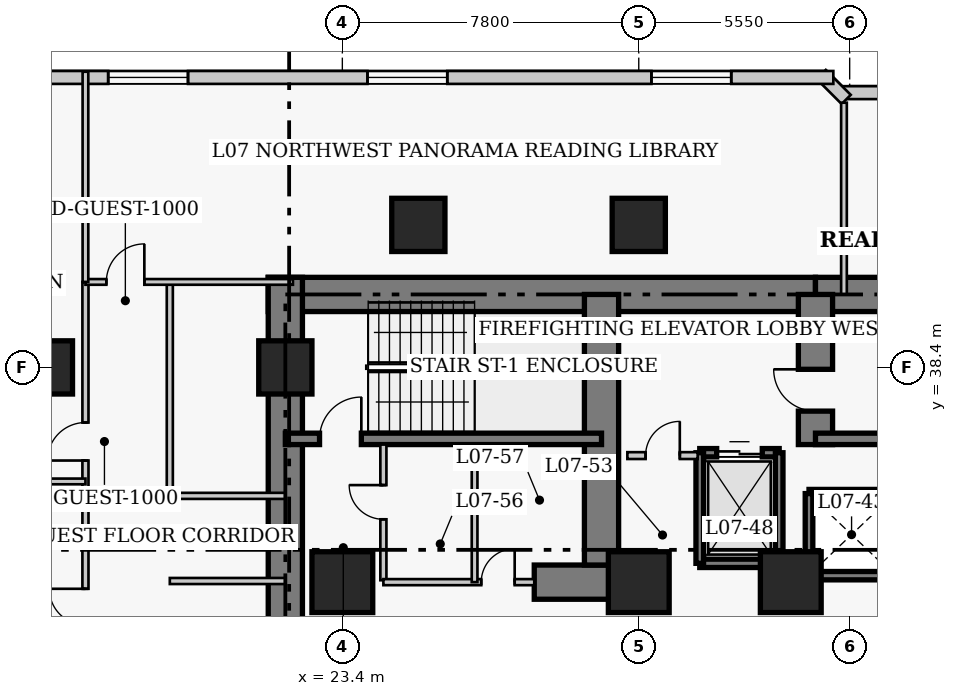
"""IFC4 building model, lengths in metres.
Left out: names, types, materials, properties, quantities, classifications, styles, units other than length and angle.
Written with IfcOpenShell. Run it as: python <this file> out.ifc"""

import sys

from ifc_helpers import new_model, si_unit, direction, frame, frame_2d, origin, origin_2d, place, context, subcontext, project, spatial, rectangle, extrude, element, fill, save


model = new_model("IFC4")
c1 = context("Model", 3, precision=1e-05, world=origin(), true_north=direction((0.0, 1.0)))
c2 = subcontext(c1, "Body", "Model", "MODEL_VIEW")
j1 = project(units=[si_unit("LENGTHUNIT", "METRE"), si_unit("PLANEANGLEUNIT", "RADIAN")], contexts=[c1])
p1 = place(None, origin())
s1 = spatial("IfcSite", under=j1, at=p1, CompositionType="ELEMENT")
p2 = place(p1, origin())
s2 = spatial("IfcBuilding", under=s1, at=p2, CompositionType="ELEMENT")
p3 = place(p2, frame((0.0, 0.0, 33.6)))
s3 = spatial("IfcBuildingStorey", under=s2, at=p3, CompositionType="ELEMENT", Elevation=33.6)
p4 = place(p3, frame((21.45, 40.32, 0.0), z_axis=(0.0, 0.0, 1.0), x_axis=(1.0, 0.0, 0.0)))
e1 = element("IfcWall", 1, at=p4, inside=s3, PredefinedType="SHEAR", context=c2, shape_type="SweptSolid", body=[
    extrude(rectangle(XDim=14.4, YDim=0.9, at=frame_2d((7.2, 0.0))), origin(), (0.0, 0.0, 1.0), 3.8),
])
p5 = place(p3, frame((35.85, 40.32, 0.0), z_axis=(0.0, 0.0, 1.0), x_axis=(1.0, 0.0, 0.0)))
e2 = element("IfcWall", 2, at=p5, inside=s3, PredefinedType="SHEAR", context=c2, shape_type="SweptSolid", body=[
    extrude(rectangle(XDim=12.6, YDim=0.9, at=frame_2d((6.3, 0.0))), origin(), (0.0, 0.0, 1.0), 3.8),
])
p6 = place(p3, frame((21.9, 27.05, 0.0), z_axis=(0.0, 0.0, 1.0), x_axis=(0.0, 1.0, 0.0)))
e3 = element("IfcWall", 3, at=p6, inside=s3, PredefinedType="SHEAR", context=c2, shape_type="SweptSolid", body=[
    extrude(rectangle(XDim=13.72, YDim=0.9, at=frame_2d((6.86, 0.0))), origin(), (0.0, 0.0, 1.0), 3.8),
])
p7 = place(p3, frame((28.45, 32.75, 0.0), z_axis=(0.0, 0.0, 1.0), x_axis=(1.0, 0.0, 0.0)))
e4 = element("IfcWall", 4, at=p7, inside=s3, PredefinedType="SHEAR", context=c2, shape_type="SweptSolid", body=[
    extrude(rectangle(XDim=2.4, YDim=0.9, at=frame_2d((1.2, 0.0))), origin(), (0.0, 0.0, 1.0), 3.8),
])
p8 = place(p3, frame((30.22, 33.2, 0.0), z_axis=(0.0, 0.0, 1.0), x_axis=(0.0, 1.0, 0.0)))
e5 = element("IfcWall", 5, at=p8, inside=s3, PredefinedType="SHEAR", context=c2, shape_type="SweptSolid", body=[
    extrude(rectangle(XDim=7.12, YDim=0.9, at=frame_2d((3.56, 0.0))), origin(), (0.0, 0.0, 1.0), 3.8),
])
p9 = place(p3, frame((35.85, 36.37, 0.0), z_axis=(0.0, 0.0, 1.0), x_axis=(0.0, 1.0, 0.0)))
e6 = element("IfcWall", 6, at=p9, inside=s3, PredefinedType="SHEAR", context=c2, shape_type="SweptSolid", body=[
    extrude(rectangle(XDim=3.95, YDim=0.9, at=frame_2d((1.975, 0.0))), origin(), (0.0, 0.0, 1.0), 3.8),
])
p10 = place(p9, frame((0.88, 0.0, 0.0)))
e7 = element("IfcOpeningElement", 7, at=p10, cuts=e6, PredefinedType="OPENING", context=c2, shape_type="SweptSolid", body=[
    extrude(rectangle(XDim=1.1, YDim=2.15, at=frame_2d((0.55, 1.075))), frame((0.0, 0.46, 0.0), z_axis=(0.0, -1.0, 0.0), x_axis=(1.0, 0.0, 0.0)), (0.0, 0.0, 1.0), 0.92),
])
p11 = place(p3, frame((21.9, 36.52, 0.0), z_axis=(0.0, 0.0, 1.0), x_axis=(1.0, 0.0, 0.0)))
e8 = element("IfcWall", 8, at=p11, inside=s3, PredefinedType="SHEAR", context=c2, shape_type="SweptSolid", body=[
    extrude(rectangle(XDim=8.32, YDim=0.3, at=frame_2d((4.16, 0.0))), origin(), (0.0, 0.0, 1.0), 3.8),
])
p12 = place(p11, frame((0.9, 0.0, 0.0)))
e9 = element("IfcOpeningElement", 9, at=p12, cuts=e8, PredefinedType="OPENING", context=c2, shape_type="SweptSolid", body=[
    extrude(rectangle(XDim=1.1, YDim=2.15, at=frame_2d((0.55, 1.075))), frame((0.0, 0.16, 0.0), z_axis=(0.0, -1.0, 0.0), x_axis=(1.0, 0.0, 0.0)), (0.0, 0.0, 1.0), 0.32),
])
p13 = place(p3, frame((35.85, 36.52, 0.0), z_axis=(0.0, 0.0, 1.0), x_axis=(1.0, 0.0, 0.0)))
e10 = element("IfcWall", 10, at=p13, inside=s3, PredefinedType="SHEAR", context=c2, shape_type="SweptSolid", body=[
    extrude(rectangle(XDim=8.33, YDim=0.3, at=frame_2d((4.165, 0.0))), origin(), (0.0, 0.0, 1.0), 3.8),
])
for number, where, z_axis, x_axis in (
    (11, (15.6, 38.4, 0.0), (0.0, 0.0, 1.0), (1.0, 0.0, 0.0)),
    (12, (21.9, 38.4, 0.0), (0.0, 0.0, 1.0), (1.0, 0.0, 0.0)),
):
    element("IfcColumn", number, at=place(p3, frame(where, z_axis=z_axis, x_axis=x_axis)), inside=s3, PredefinedType="COLUMN", context=c2, shape_type="SweptSolid", body=[
        extrude(rectangle(XDim=1.4, YDim=1.4, at=origin_2d()), origin(), (0.0, 0.0, 1.0), 3.8),
    ])
for number, where, z_axis, x_axis in (
    (13, (23.4, 32.75, 0.0), (0.0, 0.0, 1.0), (1.0, 0.0, 0.0)),
    (14, (31.2, 32.75, 0.0), (0.0, 0.0, 1.0), (1.0, 0.0, 0.0)),
    (15, (35.2, 32.75, 0.0), (0.0, 0.0, 1.0), (1.0, 0.0, 0.0)),
):
    element("IfcColumn", number, at=place(p3, frame(where, z_axis=z_axis, x_axis=x_axis)), inside=s3, PredefinedType="COLUMN", context=c2, shape_type="SweptSolid", body=[
        extrude(rectangle(XDim=1.6, YDim=1.6, at=origin_2d()), origin(), (0.0, 0.0, 1.0), 3.8),
    ])
for number, where, z_axis, x_axis in (
    (16, (25.4, 42.15, 0.0), (0.0, 0.0, 1.0), (1.0, 0.0, 0.0)),
    (17, (31.2, 42.15, 0.0), (0.0, 0.0, 1.0), (1.0, 0.0, 0.0)),
):
    element("IfcColumn", number, at=place(p3, frame(where, z_axis=z_axis, x_axis=x_axis)), inside=s3, PredefinedType="COLUMN", context=c2, shape_type="SweptSolid", body=[
        extrude(rectangle(XDim=1.4, YDim=1.4, at=origin_2d()), origin(), (0.0, 0.0, 1.0), 3.8),
    ])
p14 = place(p3, frame((41.42, 45.63, 0.0), z_axis=(0.0, 0.0, 1.0), x_axis=(-1.0, 0.0, 0.0)))
e18 = element("IfcWall", 18, at=p14, inside=s3, PredefinedType="SOLIDWALL", context=c2, shape_type="SweptSolid", body=[
    extrude(rectangle(XDim=4.84, YDim=0.34, at=frame_2d((2.42, 0.0))), origin(), (0.0, 0.0, 1.0), 3.54),
])
p15 = place(p14, frame((1.37, 0.0, 0.85)))
e19 = element("IfcOpeningElement", 19, at=p15, cuts=e18, PredefinedType="OPENING", context=c2, shape_type="SweptSolid", body=[
    extrude(rectangle(XDim=2.1, YDim=1.85, at=frame_2d((1.05, 0.925))), frame((0.0, 0.18, 0.0), z_axis=(0.0, -1.0, 0.0), x_axis=(1.0, 0.0, 0.0)), (0.0, 0.0, 1.0), 0.36),
])
p16 = place(p3, frame((36.658, 45.451, 0.0), z_axis=(0.0, 0.0, 1.0), x_axis=(-0.707106781187, 0.707106781187, 0.0)))
e20 = element("IfcWall", 20, at=p16, inside=s3, PredefinedType="SOLIDWALL", context=c2, shape_type="SweptSolid", body=[
    extrude(rectangle(XDim=0.929, YDim=0.34, at=frame_2d((0.464, 0.0))), origin(), (0.0, 0.0, 1.0), 3.54),
])
p17 = place(p3, frame((36.32, 46.03, 0.0), z_axis=(0.0, 0.0, 1.0), x_axis=(-1.0, 0.0, 0.0)))
e21 = element("IfcWall", 21, at=p17, inside=s3, PredefinedType="SOLIDWALL", context=c2, shape_type="SweptSolid", body=[
    extrude(rectangle(XDim=29.89, YDim=0.34, at=frame_2d((14.945, 0.0))), origin(), (0.0, 0.0, 1.0), 3.54),
])
p18 = place(p17, frame((2.686, 0.0, 0.85)))
e22 = element("IfcOpeningElement", 22, at=p18, cuts=e21, PredefinedType="OPENING", context=c2, shape_type="SweptSolid", body=[
    extrude(rectangle(XDim=2.1, YDim=1.85, at=frame_2d((1.05, 0.925))), frame((0.0, 0.18, 0.0), z_axis=(0.0, -1.0, 0.0), x_axis=(1.0, 0.0, 0.0)), (0.0, 0.0, 1.0), 0.36),
])
p19 = place(p17, frame((10.159, 0.0, 0.85)))
e23 = element("IfcOpeningElement", 23, at=p19, cuts=e21, PredefinedType="OPENING", context=c2, shape_type="SweptSolid", body=[
    extrude(rectangle(XDim=2.1, YDim=1.85, at=frame_2d((1.05, 0.925))), frame((0.0, 0.18, 0.0), z_axis=(0.0, -1.0, 0.0), x_axis=(1.0, 0.0, 0.0)), (0.0, 0.0, 1.0), 0.36),
])
p20 = place(p17, frame((16.981, 0.0, 0.85)))
e24 = element("IfcOpeningElement", 24, at=p20, cuts=e21, PredefinedType="OPENING", context=c2, shape_type="SweptSolid", body=[
    extrude(rectangle(XDim=2.1, YDim=1.85, at=frame_2d((1.05, 0.925))), frame((0.0, 0.18, 0.0), z_axis=(0.0, -1.0, 0.0), x_axis=(1.0, 0.0, 0.0)), (0.0, 0.0, 1.0), 0.36),
])
p21 = place(p17, frame((25.104, 0.0, 0.85)))
e25 = element("IfcOpeningElement", 25, at=p21, cuts=e21, PredefinedType="OPENING", context=c2, shape_type="SweptSolid", body=[
    extrude(rectangle(XDim=2.1, YDim=1.85, at=frame_2d((1.05, 0.925))), frame((0.0, 0.18, 0.0), z_axis=(0.0, -1.0, 0.0), x_axis=(1.0, 0.0, 0.0)), (0.0, 0.0, 1.0), 0.36),
])
for number, where, z_axis, x_axis in (
    (26, (35.68, 35.08, 0.0), (0.0, 0.0, 1.0), (1.0, 0.0, 0.0)),
    (27, (35.68, 32.92, 0.0), (0.0, 0.0, 1.0), (1.0, 0.0, 0.0)),
):
    element("IfcWall", number, at=place(p3, frame(where, z_axis=z_axis, x_axis=x_axis)), inside=s3, PredefinedType="SHEAR", context=c2, shape_type="SweptSolid", body=[
        extrude(rectangle(XDim=2.32, YDim=0.22, at=frame_2d((1.16, 0.0))), origin(), (0.0, 0.0, 1.0), 3.8),
    ])
p22 = place(p3, frame((35.68, 32.92, 0.0), z_axis=(0.0, 0.0, 1.0), x_axis=(0.0, 1.0, 0.0)))
e28 = element("IfcWall", 28, at=p22, inside=s3, PredefinedType="SHEAR", context=c2, shape_type="SweptSolid", body=[
    extrude(rectangle(XDim=2.16, YDim=0.2, at=frame_2d((1.08, 0.0))), origin(), (0.0, 0.0, 1.0), 3.8),
])
p23 = place(p3, frame((32.805, 36.155, 0.0), z_axis=(0.0, 0.0, 1.0), x_axis=(1.0, 0.0, 0.0)))
e29 = element("IfcWall", 29, at=p23, inside=s3, PredefinedType="SHEAR", context=c2, shape_type="SweptSolid", body=[
    extrude(rectangle(XDim=2.09, YDim=0.22, at=frame_2d((1.045, 0.0))), origin(), (0.0, 0.0, 1.0), 3.8),
])
p24 = place(p23, frame((0.445, 0.0, 0.0)))
e30 = element("IfcOpeningElement", 30, at=p24, cuts=e29, PredefinedType="OPENING", context=c2, shape_type="SweptSolid", body=[
    extrude(rectangle(XDim=1.2, YDim=2.15, at=frame_2d((0.6, 1.075))), frame((0.0, 0.12, 0.0), z_axis=(0.0, -1.0, 0.0), x_axis=(1.0, 0.0, 0.0)), (0.0, 0.0, 1.0), 0.24),
])
p25 = place(p3, frame((32.805, 33.245, 0.0), z_axis=(0.0, 0.0, 1.0), x_axis=(1.0, 0.0, 0.0)))
e31 = element("IfcWall", 31, at=p25, inside=s3, PredefinedType="SHEAR", context=c2, shape_type="SweptSolid", body=[
    extrude(rectangle(XDim=2.09, YDim=0.22, at=frame_2d((1.045, 0.0))), origin(), (0.0, 0.0, 1.0), 3.8),
])
for number, where, z_axis, x_axis in (
    (32, (32.805, 33.245, 0.0), (0.0, 0.0, 1.0), (0.0, 1.0, 0.0)),
    (33, (34.895, 33.245, 0.0), (0.0, 0.0, 1.0), (0.0, 1.0, 0.0)),
):
    element("IfcWall", number, at=place(p3, frame(where, z_axis=z_axis, x_axis=x_axis)), inside=s3, PredefinedType="SHEAR", context=c2, shape_type="SweptSolid", body=[
        extrude(rectangle(XDim=2.91, YDim=0.2, at=frame_2d((1.455, 0.0))), origin(), (0.0, 0.0, 1.0), 3.8),
    ])
p26 = place(p3, frame((30.9, 36.08, 0.0), z_axis=(0.0, 0.0, 1.0), x_axis=(1.0, 0.0, 0.0)))
e34 = element("IfcWall", 34, at=p26, inside=s3, PredefinedType="PARTITIONING", context=c2, shape_type="SweptSolid", body=[
    extrude(rectangle(XDim=1.85, YDim=0.18, at=frame_2d((0.925, 0.0))), origin(), (0.0, 0.0, 1.0), 3.54),
])
p27 = place(p26, frame((0.48, 0.0, 0.0)))
e35 = element("IfcOpeningElement", 35, at=p27, cuts=e34, PredefinedType="OPENING", context=c2, shape_type="SweptSolid", body=[
    extrude(rectangle(XDim=0.9, YDim=2.15, at=frame_2d((0.45, 1.075))), frame((0.0, 0.1, 0.0), z_axis=(0.0, -1.0, 0.0), x_axis=(1.0, 0.0, 0.0)), (0.0, 0.0, 1.0), 0.2),
])
p28 = place(p3, frame((24.48, 32.8, 0.0), z_axis=(0.0, 0.0, 1.0), x_axis=(0.0, 1.0, 0.0)))
e36 = element("IfcWall", 36, at=p28, inside=s3, PredefinedType="PARTITIONING", context=c2, shape_type="SweptSolid", body=[
    extrude(rectangle(XDim=3.57, YDim=0.16, at=frame_2d((1.785, 0.0))), origin(), (0.0, 0.0, 1.0), 3.54),
])
p29 = place(p28, frame((1.604, 0.0, 0.0)))
e37 = element("IfcOpeningElement", 37, at=p29, cuts=e36, PredefinedType="OPENING", context=c2, shape_type="SweptSolid", body=[
    extrude(rectangle(XDim=0.9, YDim=2.1, at=frame_2d((0.45, 1.05))), frame((0.0, 0.09, 0.0), z_axis=(0.0, -1.0, 0.0), x_axis=(1.0, 0.0, 0.0)), (0.0, 0.0, 1.0), 0.18),
])
p30 = place(p3, frame((24.48, 32.75, 0.0), z_axis=(0.0, 0.0, 1.0), x_axis=(1.0, 0.0, 0.0)))
e38 = element("IfcWall", 38, at=p30, inside=s3, PredefinedType="PARTITIONING", context=c2, shape_type="SweptSolid", body=[
    extrude(rectangle(XDim=3.97, YDim=0.16, at=frame_2d((1.985, 0.0))), origin(), (0.0, 0.0, 1.0), 3.54),
])
p31 = place(p30, frame((2.575, 0.0, 0.0)))
e39 = element("IfcOpeningElement", 39, at=p31, cuts=e38, PredefinedType="OPENING", context=c2, shape_type="SweptSolid", body=[
    extrude(rectangle(XDim=0.88, YDim=2.05, at=frame_2d((0.44, 1.025))), frame((0.0, 0.09, 0.0), z_axis=(0.0, -1.0, 0.0), x_axis=(1.0, 0.0, 0.0)), (0.0, 0.0, 1.0), 0.18),
])
p32 = place(p3, frame((26.88, 32.75, 0.0), z_axis=(0.0, 0.0, 1.0), x_axis=(0.0, 1.0, 0.0)))
e40 = element("IfcWall", 40, at=p32, inside=s3, PredefinedType="PARTITIONING", context=c2, shape_type="SweptSolid", body=[
    extrude(rectangle(XDim=3.62, YDim=0.15, at=frame_2d((1.81, 0.0))), origin(), (0.0, 0.0, 1.0), 3.54),
])
p33 = place(p3, frame((16.64, 5.05, 0.0), z_axis=(0.0, 0.0, 1.0), x_axis=(0.0, 1.0, 0.0)))
e41 = element("IfcWall", 41, at=p33, inside=s3, PredefinedType="PARTITIONING", context=c2, shape_type="SweptSolid", body=[
    extrude(rectangle(XDim=35.6, YDim=0.16, at=frame_2d((17.8, 0.0))), origin(), (0.0, 0.0, 1.0), 3.54),
])
p34 = place(p33, frame((2.6, 0.0, 0.0)))
e42 = element("IfcOpeningElement", 42, at=p34, cuts=e41, PredefinedType="OPENING", context=c2, shape_type="SweptSolid", body=[
    extrude(rectangle(XDim=0.95, YDim=2.1, at=frame_2d((0.475, 1.05))), frame((0.0, 0.09, 0.0), z_axis=(0.0, -1.0, 0.0), x_axis=(1.0, 0.0, 0.0)), (0.0, 0.0, 1.0), 0.18),
])
p35 = place(p33, frame((10.075, 0.0, 0.0)))
e43 = element("IfcOpeningElement", 43, at=p35, cuts=e41, PredefinedType="OPENING", context=c2, shape_type="SweptSolid", body=[
    extrude(rectangle(XDim=0.95, YDim=2.1, at=frame_2d((0.475, 1.05))), frame((0.0, 0.09, 0.0), z_axis=(0.0, -1.0, 0.0), x_axis=(1.0, 0.0, 0.0)), (0.0, 0.0, 1.0), 0.18),
])
p36 = place(p33, frame((18.875, 0.0, 0.0)))
e44 = element("IfcOpeningElement", 44, at=p36, cuts=e41, PredefinedType="OPENING", context=c2, shape_type="SweptSolid", body=[
    extrude(rectangle(XDim=0.95, YDim=2.1, at=frame_2d((0.475, 1.05))), frame((0.0, 0.09, 0.0), z_axis=(0.0, -1.0, 0.0), x_axis=(1.0, 0.0, 0.0)), (0.0, 0.0, 1.0), 0.18),
])
p37 = place(p33, frame((26.575, 0.0, 0.0)))
e45 = element("IfcOpeningElement", 45, at=p37, cuts=e41, PredefinedType="OPENING", context=c2, shape_type="SweptSolid", body=[
    extrude(rectangle(XDim=0.95, YDim=2.1, at=frame_2d((0.475, 1.05))), frame((0.0, 0.09, 0.0), z_axis=(0.0, -1.0, 0.0), x_axis=(1.0, 0.0, 0.0)), (0.0, 0.0, 1.0), 0.18),
])
p38 = place(p33, frame((30.9, 0.0, 0.0)))
e46 = element("IfcOpeningElement", 46, at=p38, cuts=e41, PredefinedType="OPENING", context=c2, shape_type="SweptSolid", body=[
    extrude(rectangle(XDim=1.0, YDim=2.15, at=frame_2d((0.5, 1.075))), frame((0.0, 0.09, 0.0), z_axis=(0.0, -1.0, 0.0), x_axis=(1.0, 0.0, 0.0)), (0.0, 0.0, 1.0), 0.18),
])
p39 = place(p3, frame((18.86, 35.02, 0.0), z_axis=(0.0, 0.0, 1.0), x_axis=(0.0, 1.0, 0.0)))
e47 = element("IfcWall", 47, at=p39, inside=s3, PredefinedType="PARTITIONING", context=c2, shape_type="SweptSolid", body=[
    extrude(rectangle(XDim=5.63, YDim=0.16, at=frame_2d((2.815, 0.0))), origin(), (0.0, 0.0, 1.0), 3.54),
])
for number, where, z_axis, x_axis in (
    (48, (18.86, 35.02, 0.0), (0.0, 0.0, 1.0), (1.0, 0.0, 0.0)),
    (49, (18.86, 32.78, 0.0), (0.0, 0.0, 1.0), (1.0, 0.0, 0.0)),
):
    element("IfcWall", number, at=place(p3, frame(where, z_axis=z_axis, x_axis=x_axis)), inside=s3, PredefinedType="PARTITIONING", context=c2, shape_type="SweptSolid", body=[
        extrude(rectangle(XDim=3.04, YDim=0.16, at=frame_2d((1.52, 0.0))), origin(), (0.0, 0.0, 1.0), 3.54),
    ])
p40 = place(p3, frame((16.64, 40.65, 0.0), z_axis=(0.0, 0.0, 1.0), x_axis=(1.0, 0.0, 0.0)))
e50 = element("IfcWall", 50, at=p40, inside=s3, PredefinedType="PARTITIONING", context=c2, shape_type="SweptSolid", body=[
    extrude(rectangle(XDim=5.46, YDim=0.15, at=frame_2d((2.73, 0.0))), origin(), (0.0, 0.0, 1.0), 3.54),
])
p41 = place(p40, frame((0.55, 0.0, 0.0)))
e51 = element("IfcOpeningElement", 51, at=p41, cuts=e50, PredefinedType="OPENING", context=c2, shape_type="SweptSolid", body=[
    extrude(rectangle(XDim=1.0, YDim=2.15, at=frame_2d((0.5, 1.075))), frame((0.0, 0.085, 0.0), z_axis=(0.0, -1.0, 0.0), x_axis=(1.0, 0.0, 0.0)), (0.0, 0.0, 1.0), 0.17),
])
p42 = place(p3, frame((16.64, 40.65, 0.0), z_axis=(0.0, 0.0, 1.0), x_axis=(0.0, 1.0, 0.0)))
e52 = element("IfcWall", 52, at=p42, inside=s3, PredefinedType="PARTITIONING", context=c2, shape_type="SweptSolid", body=[
    extrude(rectangle(XDim=5.53, YDim=0.15, at=frame_2d((2.765, 0.0))), origin(), (0.0, 0.0, 1.0), 3.54),
])
p43 = place(p3, frame((36.6, 40.32, 0.0), z_axis=(0.0, 0.0, 1.0), x_axis=(0.0, 1.0, 0.0)))
e53 = element("IfcWall", 53, at=p43, inside=s3, PredefinedType="PARTITIONING", context=c2, shape_type="SweptSolid", body=[
    extrude(rectangle(XDim=5.045, YDim=0.15, at=frame_2d((2.522, 0.0))), origin(), (0.0, 0.0, 1.0), 3.54),
])
p44 = place(p3, frame((14.45, 35.4, 0.0), z_axis=(0.0, 0.0, 1.0), x_axis=(1.0, 0.0, 0.0)))
e54 = element("IfcWall", 54, at=p44, inside=s3, PredefinedType="PARTITIONING", context=c2, shape_type="SweptSolid", body=[
    extrude(rectangle(XDim=2.19, YDim=0.15, at=frame_2d((1.095, 0.0))), origin(), (0.0, 0.0, 1.0), 3.54),
])
p45 = place(p18, origin())
e55 = element("IfcWindow", 55, at=p45, inside=s3, PartitioningType="SINGLE_PANEL", PredefinedType="WINDOW", context=c2, shape_type="SweptSolid", body=[
    extrude(rectangle(XDim=2.1, YDim=1.85, at=frame_2d((1.05, 0.925))), frame((0.0, 0.03, 0.0), z_axis=(0.0, -1.0, 0.0), x_axis=(1.0, 0.0, 0.0)), (0.0, 0.0, 1.0), 0.06),
])
fill(e22, e55)
p46 = place(p19, origin())
e56 = element("IfcWindow", 56, at=p46, inside=s3, PartitioningType="SINGLE_PANEL", PredefinedType="WINDOW", context=c2, shape_type="SweptSolid", body=[
    extrude(rectangle(XDim=2.1, YDim=1.85, at=frame_2d((1.05, 0.925))), frame((0.0, 0.03, 0.0), z_axis=(0.0, -1.0, 0.0), x_axis=(1.0, 0.0, 0.0)), (0.0, 0.0, 1.0), 0.06),
])
fill(e23, e56)
p47 = place(p20, origin())
e57 = element("IfcWindow", 57, at=p47, inside=s3, PartitioningType="SINGLE_PANEL", PredefinedType="WINDOW", context=c2, shape_type="SweptSolid", body=[
    extrude(rectangle(XDim=2.1, YDim=1.85, at=frame_2d((1.05, 0.925))), frame((0.0, 0.03, 0.0), z_axis=(0.0, -1.0, 0.0), x_axis=(1.0, 0.0, 0.0)), (0.0, 0.0, 1.0), 0.06),
])
fill(e24, e57)
p48 = place(p24, origin())
e58 = element("IfcDoor", 58, at=p48, inside=s3, OperationType="DOUBLE_DOOR_SLIDING", PredefinedType="DOOR", context=c2, shape_type="SweptSolid", body=[
    extrude(rectangle(XDim=1.2, YDim=2.15, at=frame_2d((0.6, 1.075))), frame((0.0, 0.025, 0.0), z_axis=(0.0, -1.0, 0.0), x_axis=(1.0, 0.0, 0.0)), (0.0, 0.0, 1.0), 0.05),
])
fill(e30, e58)
p49 = place(p27, origin())
e59 = element("IfcDoor", 59, at=p49, inside=s3, OperationType="SINGLE_SWING_RIGHT", PredefinedType="DOOR", context=c2, shape_type="SweptSolid", body=[
    extrude(rectangle(XDim=0.9, YDim=2.15, at=frame_2d((0.45, 1.075))), frame((0.0, 0.025, 0.0), z_axis=(0.0, -1.0, 0.0), x_axis=(1.0, 0.0, 0.0)), (0.0, 0.0, 1.0), 0.05),
])
fill(e35, e59)
p50 = place(p29, origin())
e60 = element("IfcDoor", 60, at=p50, inside=s3, OperationType="SINGLE_SWING_RIGHT", PredefinedType="DOOR", context=c2, shape_type="SweptSolid", body=[
    extrude(rectangle(XDim=0.9, YDim=2.1, at=frame_2d((0.45, 1.05))), frame((0.0, 0.025, 0.0), z_axis=(0.0, -1.0, 0.0), x_axis=(1.0, 0.0, 0.0)), (0.0, 0.0, 1.0), 0.05),
])
fill(e37, e60)
p51 = place(p31, origin())
e61 = element("IfcDoor", 61, at=p51, inside=s3, OperationType="SINGLE_SWING_RIGHT", PredefinedType="DOOR", context=c2, shape_type="SweptSolid", body=[
    extrude(rectangle(XDim=0.88, YDim=2.05, at=frame_2d((0.44, 1.025))), frame((0.0, 0.025, 0.0), z_axis=(0.0, -1.0, 0.0), x_axis=(1.0, 0.0, 0.0)), (0.0, 0.0, 1.0), 0.05),
])
fill(e39, e61)
p52 = place(p41, origin())
e62 = element("IfcDoor", 62, at=p52, inside=s3, OperationType="SINGLE_SWING_RIGHT", PredefinedType="DOOR", context=c2, shape_type="SweptSolid", body=[
    extrude(rectangle(XDim=1.0, YDim=2.15, at=frame_2d((0.5, 1.075))), frame((0.0, 0.025, 0.0), z_axis=(0.0, -1.0, 0.0), x_axis=(1.0, 0.0, 0.0)), (0.0, 0.0, 1.0), 0.05),
])
fill(e51, e62)
p53 = place(p37, origin())
e63 = element("IfcDoor", 63, at=p53, inside=s3, OperationType="SINGLE_SWING_RIGHT", PredefinedType="DOOR", context=c2, shape_type="SweptSolid", body=[
    extrude(rectangle(XDim=0.95, YDim=2.1, at=frame_2d((0.475, 1.05))), frame((0.0, 0.025, 0.0), z_axis=(0.0, -1.0, 0.0), x_axis=(1.0, 0.0, 0.0)), (0.0, 0.0, 1.0), 0.05),
])
fill(e45, e63)
p54 = place(p38, origin())
e64 = element("IfcDoor", 64, at=p54, inside=s3, OperationType="SINGLE_SWING_LEFT", PredefinedType="DOOR", context=c2, shape_type="SweptSolid", body=[
    extrude(rectangle(XDim=1.0, YDim=2.15, at=frame_2d((0.5, 1.075))), frame((0.0, 0.025, 0.0), z_axis=(0.0, -1.0, 0.0), x_axis=(1.0, 0.0, 0.0)), (0.0, 0.0, 1.0), 0.05),
])
fill(e46, e64)
p55 = place(p12, origin())
e65 = element("IfcDoor", 65, at=p55, inside=s3, OperationType="SINGLE_SWING_RIGHT", PredefinedType="DOOR", context=c2, shape_type="SweptSolid", body=[
    extrude(rectangle(XDim=1.1, YDim=2.15, at=frame_2d((0.55, 1.075))), frame((0.0, 0.025, 0.0), z_axis=(0.0, -1.0, 0.0), x_axis=(1.0, 0.0, 0.0)), (0.0, 0.0, 1.0), 0.05),
])
fill(e9, e65)
p56 = place(p10, origin())
e66 = element("IfcDoor", 66, at=p56, inside=s3, OperationType="SINGLE_SWING_RIGHT", PredefinedType="DOOR", context=c2, shape_type="SweptSolid", body=[
    extrude(rectangle(XDim=1.1, YDim=2.15, at=frame_2d((0.55, 1.075))), frame((0.0, 0.025, 0.0), z_axis=(0.0, -1.0, 0.0), x_axis=(1.0, 0.0, 0.0)), (0.0, 0.0, 1.0), 0.05),
])
fill(e7, e66)
save(model, sys.argv[1])
